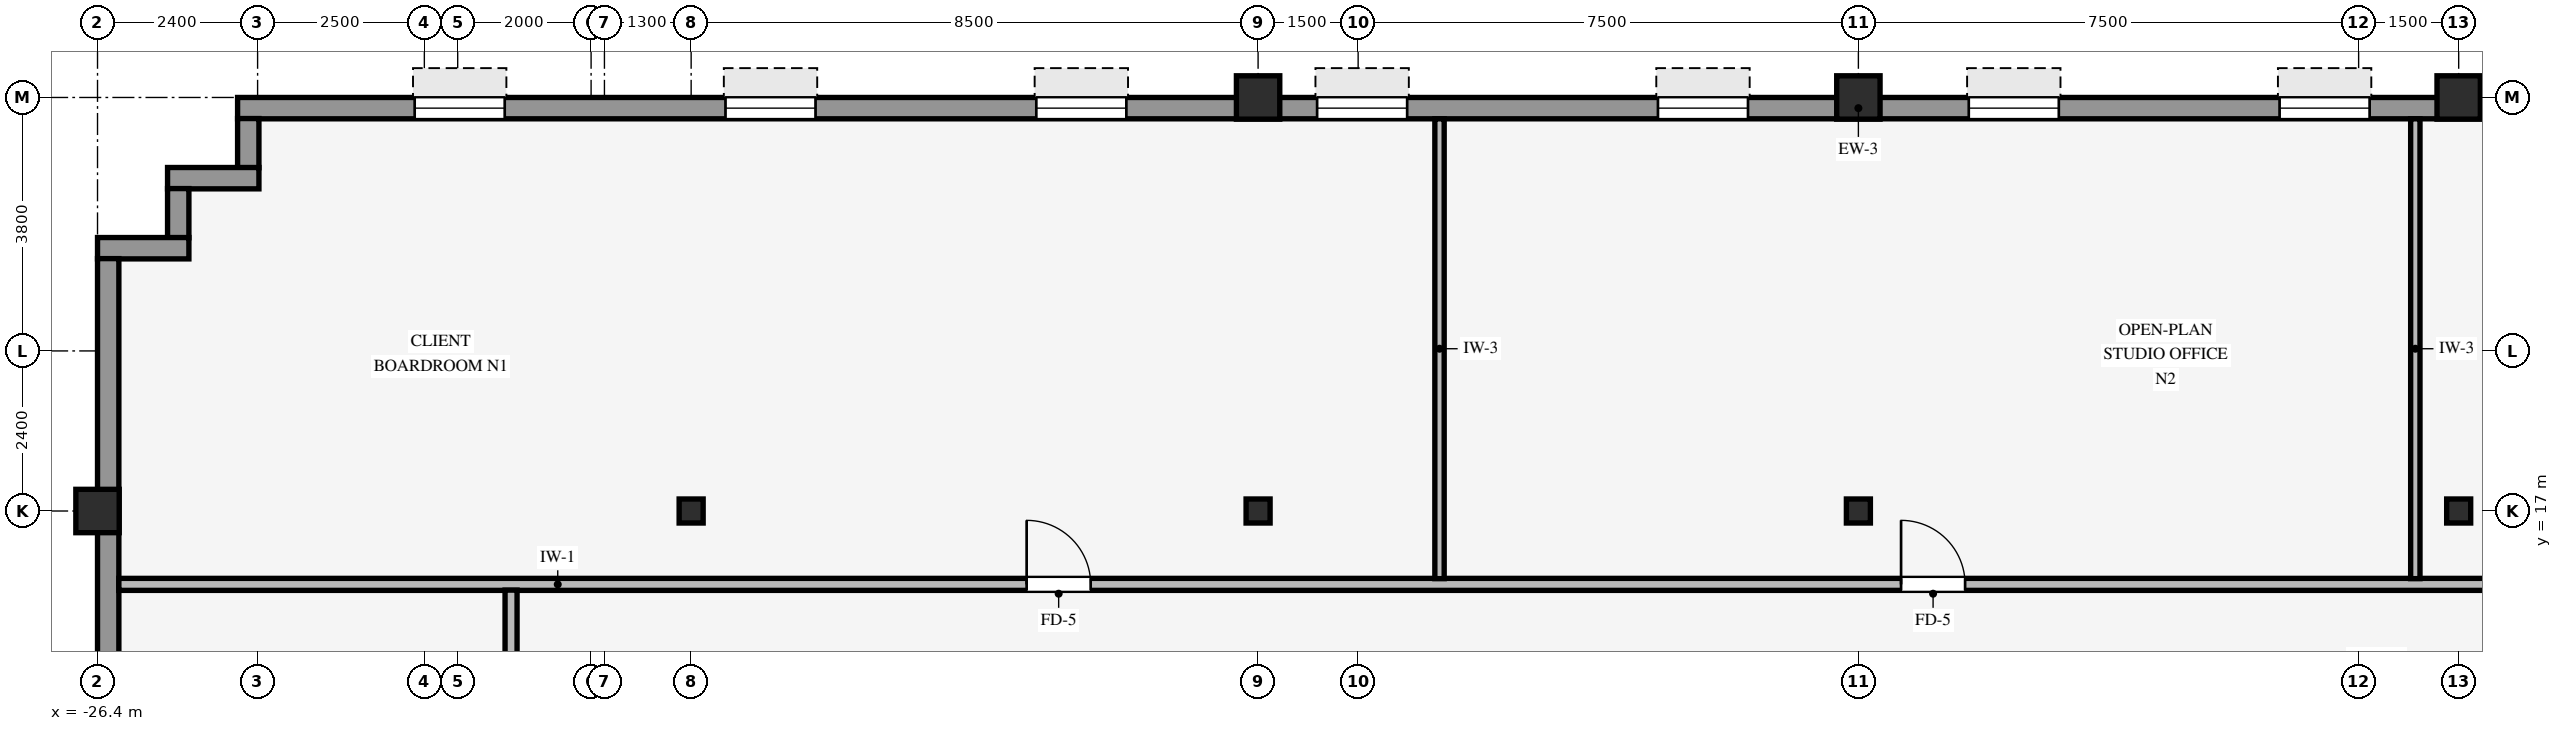
"""IFC4 building model, lengths in metres.
Left out: names, types, materials, properties, quantities, classifications, styles, units other than length and angle.
Written with IfcOpenShell. Run it as: python <this file> out.ifc"""

import sys

from ifc_helpers import new_model, si_unit, direction, frame, frame_2d, origin, origin_2d, place, context, subcontext, project, spatial, rectangle, hollow_rectangle, i_section, extrude, source, transform, mapped, element, fill, save


model = new_model("IFC4")
c1 = context("Model", 3, precision=1e-05, world=origin(), true_north=direction((0.0, 1.0)))
c2 = subcontext(c1, "Body", "Model", "MODEL_VIEW")
j1 = project(units=[si_unit("LENGTHUNIT", "METRE"), si_unit("PLANEANGLEUNIT", "RADIAN")], contexts=[c1])
p1 = place(None, origin())
s1 = spatial("IfcSite", under=j1, at=p1, CompositionType="ELEMENT")
p2 = place(p1, origin())
s2 = spatial("IfcBuilding", under=s1, at=p2, CompositionType="ELEMENT")
p3 = place(p2, frame((0.0, 0.0, 153.05)))
s3 = spatial("IfcBuildingStorey", under=s2, at=p3, CompositionType="ELEMENT", Elevation=153.05)
for number, where, z_axis, x_axis in (
    (1, (-26.4, 17.0, 0.0), (0.0, 0.0, 1.0), (1.0, 0.0, 0.0)),
    (2, (-9.0, 23.2, 0.0), (0.0, 0.0, 1.0), (1.0, 0.0, 0.0)),
    (3, (0.0, 23.2, 0.0), (0.0, 0.0, 1.0), (1.0, 0.0, 0.0)),
    (4, (9.0, 23.2, 0.0), (0.0, 0.0, 1.0), (1.0, 0.0, 0.0)),
):
    element("IfcColumn", number, at=place(p3, frame(where, z_axis=z_axis, x_axis=x_axis)), inside=s3, PredefinedType="COLUMN", context=c2, shape_type="SweptSolid", body=[
        extrude(hollow_rectangle(XDim=0.65, YDim=0.65, WallThickness=0.04, InnerFilletRadius=0.04, OuterFilletRadius=0.08, at=origin_2d()), origin(), (0.0, 0.0, 1.0), 3.37),
    ])
for number, where, z_axis, x_axis in (
    (5, (0.0, 17.0, 0.0), (0.0, 0.0, 1.0), (1.0, 0.0, 0.0)),
    (6, (-17.5, 17.0, 0.0), (0.0, 0.0, 1.0), (1.0, 0.0, 0.0)),
    (7, (-9.0, 17.0, 0.0), (0.0, 0.0, 1.0), (1.0, 0.0, 0.0)),
    (8, (9.0, 17.0, 0.0), (0.0, 0.0, 1.0), (1.0, 0.0, 0.0)),
):
    element("IfcColumn", number, at=place(p3, frame(where, z_axis=z_axis, x_axis=x_axis)), inside=s3, PredefinedType="COLUMN", context=c2, shape_type="SweptSolid", body=[
        extrude(i_section(OverallWidth=0.36, OverallDepth=0.36, WebThickness=0.021, FlangeThickness=0.021, FilletRadius=0.018, at=origin_2d()), origin(), (0.0, 0.0, 1.0), 3.37),
    ])
p4 = place(p3, frame((-24.3, 23.04, 0.0), z_axis=(0.0, 0.0, 1.0), x_axis=(1.0, 0.0, 0.0)))
e9 = element("IfcWall", 9, at=p4, inside=s3, PredefinedType="STANDARD", context=c2, shape_type="SweptSolid", body=[
    extrude(rectangle(XDim=48.6, YDim=0.32, at=frame_2d((24.3, 0.0))), origin(), (0.0, 0.0, 1.0), 2.705),
])
p5 = place(p4, frame((2.655, 0.0, 0.8)))
e10 = element("IfcOpeningElement", 10, at=p5, cuts=e9, PredefinedType="OPENING", context=c2, shape_type="SweptSolid", body=[
    extrude(rectangle(XDim=1.35, YDim=1.56, at=frame_2d((0.675, 0.78))), frame((0.0, 0.17, 0.0), z_axis=(0.0, -1.0, 0.0), x_axis=(1.0, 0.0, 0.0)), (0.0, 0.0, 1.0), 0.34),
])
p6 = place(p4, frame((7.315, 0.0, 0.8)))
e11 = element("IfcOpeningElement", 11, at=p6, cuts=e9, PredefinedType="OPENING", context=c2, shape_type="SweptSolid", body=[
    extrude(rectangle(XDim=1.35, YDim=1.56, at=frame_2d((0.675, 0.78))), frame((0.0, 0.17, 0.0), z_axis=(0.0, -1.0, 0.0), x_axis=(1.0, 0.0, 0.0)), (0.0, 0.0, 1.0), 0.34),
])
p7 = place(p4, frame((11.975, 0.0, 0.8)))
e12 = element("IfcOpeningElement", 12, at=p7, cuts=e9, PredefinedType="OPENING", context=c2, shape_type="SweptSolid", body=[
    extrude(rectangle(XDim=1.35, YDim=1.56, at=frame_2d((0.675, 0.78))), frame((0.0, 0.17, 0.0), z_axis=(0.0, -1.0, 0.0), x_axis=(1.0, 0.0, 0.0)), (0.0, 0.0, 1.0), 0.34),
])
p8 = place(p4, frame((16.185, 0.0, 0.8)))
e13 = element("IfcOpeningElement", 13, at=p8, cuts=e9, PredefinedType="OPENING", context=c2, shape_type="SweptSolid", body=[
    extrude(rectangle(XDim=1.35, YDim=1.56, at=frame_2d((0.675, 0.78))), frame((0.0, 0.17, 0.0), z_axis=(0.0, -1.0, 0.0), x_axis=(1.0, 0.0, 0.0)), (0.0, 0.0, 1.0), 0.34),
])
p9 = place(p4, frame((21.295, 0.0, 0.8)))
e14 = element("IfcOpeningElement", 14, at=p9, cuts=e9, PredefinedType="OPENING", context=c2, shape_type="SweptSolid", body=[
    extrude(rectangle(XDim=1.35, YDim=1.56, at=frame_2d((0.675, 0.78))), frame((0.0, 0.17, 0.0), z_axis=(0.0, -1.0, 0.0), x_axis=(1.0, 0.0, 0.0)), (0.0, 0.0, 1.0), 0.34),
])
p10 = place(p4, frame((25.955, 0.0, 0.8)))
e15 = element("IfcOpeningElement", 15, at=p10, cuts=e9, PredefinedType="OPENING", context=c2, shape_type="SweptSolid", body=[
    extrude(rectangle(XDim=1.35, YDim=1.56, at=frame_2d((0.675, 0.78))), frame((0.0, 0.17, 0.0), z_axis=(0.0, -1.0, 0.0), x_axis=(1.0, 0.0, 0.0)), (0.0, 0.0, 1.0), 0.34),
])
p11 = place(p4, frame((30.615, 0.0, 0.8)))
e16 = element("IfcOpeningElement", 16, at=p11, cuts=e9, PredefinedType="OPENING", context=c2, shape_type="SweptSolid", body=[
    extrude(rectangle(XDim=1.35, YDim=1.56, at=frame_2d((0.675, 0.78))), frame((0.0, 0.17, 0.0), z_axis=(0.0, -1.0, 0.0), x_axis=(1.0, 0.0, 0.0)), (0.0, 0.0, 1.0), 0.34),
])
p12 = place(p4, frame((35.275, 0.0, 0.8)))
e17 = element("IfcOpeningElement", 17, at=p12, cuts=e9, PredefinedType="OPENING", context=c2, shape_type="SweptSolid", body=[
    extrude(rectangle(XDim=1.35, YDim=1.56, at=frame_2d((0.675, 0.78))), frame((0.0, 0.17, 0.0), z_axis=(0.0, -1.0, 0.0), x_axis=(1.0, 0.0, 0.0)), (0.0, 0.0, 1.0), 0.34),
])
p13 = place(p4, frame((39.935, 0.0, 0.8)))
e18 = element("IfcOpeningElement", 18, at=p13, cuts=e9, PredefinedType="OPENING", context=c2, shape_type="SweptSolid", body=[
    extrude(rectangle(XDim=1.35, YDim=1.56, at=frame_2d((0.675, 0.78))), frame((0.0, 0.17, 0.0), z_axis=(0.0, -1.0, 0.0), x_axis=(1.0, 0.0, 0.0)), (0.0, 0.0, 1.0), 0.34),
])
p14 = place(p4, frame((44.595, 0.0, 0.8)))
e19 = element("IfcOpeningElement", 19, at=p14, cuts=e9, PredefinedType="OPENING", context=c2, shape_type="SweptSolid", body=[
    extrude(rectangle(XDim=1.35, YDim=1.56, at=frame_2d((0.675, 0.78))), frame((0.0, 0.17, 0.0), z_axis=(0.0, -1.0, 0.0), x_axis=(1.0, 0.0, 0.0)), (0.0, 0.0, 1.0), 0.34),
])
p15 = place(p3, frame((-24.14, 22.146, 0.0), z_axis=(0.0, 0.0, 1.0), x_axis=(0.0, 1.0, 0.0)))
e20 = element("IfcWall", 20, at=p15, inside=s3, PredefinedType="STANDARD", context=c2, shape_type="SweptSolid", body=[
    extrude(rectangle(XDim=0.738, YDim=0.32, at=frame_2d((0.369, 0.0))), origin(), (0.0, 0.0, 1.0), 3.36),
])
p16 = place(p3, frame((-25.35, 21.99, 0.0), z_axis=(0.0, 0.0, 1.0), x_axis=(1.0, 0.0, 0.0)))
e21 = element("IfcWall", 21, at=p16, inside=s3, PredefinedType="STANDARD", context=c2, shape_type="SweptSolid", body=[
    extrude(rectangle(XDim=1.37, YDim=0.32, at=frame_2d((0.685, 0.0))), origin(), (0.0, 0.0, 1.0), 3.36),
])
p17 = place(p3, frame((-25.19, 21.096, 0.0), z_axis=(0.0, 0.0, 1.0), x_axis=(0.0, 1.0, 0.0)))
e22 = element("IfcWall", 22, at=p17, inside=s3, PredefinedType="STANDARD", context=c2, shape_type="SweptSolid", body=[
    extrude(rectangle(XDim=0.738, YDim=0.32, at=frame_2d((0.369, 0.0))), origin(), (0.0, 0.0, 1.0), 3.36),
])
p18 = place(p3, frame((-26.4, 20.94, 0.0), z_axis=(0.0, 0.0, 1.0), x_axis=(1.0, 0.0, 0.0)))
e23 = element("IfcWall", 23, at=p18, inside=s3, PredefinedType="STANDARD", context=c2, shape_type="SweptSolid", body=[
    extrude(rectangle(XDim=1.37, YDim=0.32, at=frame_2d((0.685, 0.0))), origin(), (0.0, 0.0, 1.0), 3.36),
])
p19 = place(p3, frame((-26.24, -20.784, 0.0), z_axis=(0.0, 0.0, 1.0), x_axis=(0.0, 1.0, 0.0)))
e24 = element("IfcWall", 24, at=p19, inside=s3, PredefinedType="STANDARD", context=c2, shape_type="SweptSolid", body=[
    extrude(rectangle(XDim=41.568, YDim=0.32, at=frame_2d((20.784, 0.0))), origin(), (0.0, 0.0, 1.0), 2.705),
])
p20 = place(p19, frame((7.369, 0.0, 0.8)))
e25 = element("IfcOpeningElement", 25, at=p20, cuts=e24, PredefinedType="OPENING", context=c2, shape_type="SweptSolid", body=[
    extrude(rectangle(XDim=2.1, YDim=1.56, at=frame_2d((1.05, 0.78))), frame((0.0, 0.17, 0.0), z_axis=(0.0, -1.0, 0.0), x_axis=(1.0, 0.0, 0.0)), (0.0, 0.0, 1.0), 0.34),
])
p21 = place(p19, frame((12.315, 0.0, 0.8)))
e26 = element("IfcOpeningElement", 26, at=p21, cuts=e24, PredefinedType="OPENING", context=c2, shape_type="SweptSolid", body=[
    extrude(rectangle(XDim=2.1, YDim=1.56, at=frame_2d((1.05, 0.78))), frame((0.0, 0.17, 0.0), z_axis=(0.0, -1.0, 0.0), x_axis=(1.0, 0.0, 0.0)), (0.0, 0.0, 1.0), 0.34),
])
p22 = place(p19, frame((17.261, 0.0, 0.8)))
e27 = element("IfcOpeningElement", 27, at=p22, cuts=e24, PredefinedType="OPENING", context=c2, shape_type="SweptSolid", body=[
    extrude(rectangle(XDim=2.1, YDim=1.56, at=frame_2d((1.05, 0.78))), frame((0.0, 0.17, 0.0), z_axis=(0.0, -1.0, 0.0), x_axis=(1.0, 0.0, 0.0)), (0.0, 0.0, 1.0), 0.34),
])
p23 = place(p19, frame((22.207, 0.0, 0.8)))
e28 = element("IfcOpeningElement", 28, at=p23, cuts=e24, PredefinedType="OPENING", context=c2, shape_type="SweptSolid", body=[
    extrude(rectangle(XDim=2.1, YDim=1.56, at=frame_2d((1.05, 0.78))), frame((0.0, 0.17, 0.0), z_axis=(0.0, -1.0, 0.0), x_axis=(1.0, 0.0, 0.0)), (0.0, 0.0, 1.0), 0.34),
])
p24 = place(p19, frame((27.153, 0.0, 0.8)))
e29 = element("IfcOpeningElement", 29, at=p24, cuts=e24, PredefinedType="OPENING", context=c2, shape_type="SweptSolid", body=[
    extrude(rectangle(XDim=2.1, YDim=1.56, at=frame_2d((1.05, 0.78))), frame((0.0, 0.17, 0.0), z_axis=(0.0, -1.0, 0.0), x_axis=(1.0, 0.0, 0.0)), (0.0, 0.0, 1.0), 0.34),
])
p25 = place(p19, frame((32.099, 0.0, 0.8)))
e30 = element("IfcOpeningElement", 30, at=p25, cuts=e24, PredefinedType="OPENING", context=c2, shape_type="SweptSolid", body=[
    extrude(rectangle(XDim=2.1, YDim=1.56, at=frame_2d((1.05, 0.78))), frame((0.0, 0.17, 0.0), z_axis=(0.0, -1.0, 0.0), x_axis=(1.0, 0.0, 0.0)), (0.0, 0.0, 1.0), 0.34),
])
p26 = place(p3, frame((-26.08, 15.9, 0.0), z_axis=(0.0, 0.0, 1.0), x_axis=(1.0, 0.0, 0.0)))
e31 = element("IfcWall", 31, at=p26, inside=s3, PredefinedType="PARTITIONING", context=c2, shape_type="SweptSolid", body=[
    extrude(rectangle(XDim=52.16, YDim=0.18, at=frame_2d((26.08, 0.0))), origin(), (0.0, 0.0, 1.0), 3.36),
])
p27 = place(p26, frame((26.72, 0.0, 0.0)))
e32 = element("IfcOpeningElement", 32, at=p27, cuts=e31, PredefinedType="OPENING", context=c2, shape_type="SweptSolid", body=[
    extrude(rectangle(XDim=0.96, YDim=2.1, at=frame_2d((0.48, 1.05))), frame((0.0, 0.1, 0.0), z_axis=(0.0, -1.0, 0.0), x_axis=(1.0, 0.0, 0.0)), (0.0, 0.0, 1.0), 0.2),
])
p28 = place(p26, frame((40.5, 0.0, 0.0)))
e33 = element("IfcOpeningElement", 33, at=p28, cuts=e31, PredefinedType="OPENING", context=c2, shape_type="SweptSolid", body=[
    extrude(rectangle(XDim=0.96, YDim=2.1, at=frame_2d((0.48, 1.05))), frame((0.0, 0.1, 0.0), z_axis=(0.0, -1.0, 0.0), x_axis=(1.0, 0.0, 0.0)), (0.0, 0.0, 1.0), 0.2),
])
p29 = place(p26, frame((13.61, 0.0, 0.0)))
e34 = element("IfcOpeningElement", 34, at=p29, cuts=e31, PredefinedType="OPENING", context=c2, shape_type="SweptSolid", body=[
    extrude(rectangle(XDim=0.96, YDim=2.1, at=frame_2d((0.48, 1.05))), frame((0.0, 0.1, 0.0), z_axis=(0.0, -1.0, 0.0), x_axis=(1.0, 0.0, 0.0)), (0.0, 0.0, 1.0), 0.2),
])
p30 = place(p3, frame((-20.2, -15.814, 0.0), z_axis=(0.0, 0.0, 1.0), x_axis=(0.0, 1.0, 0.0)))
e35 = element("IfcWall", 35, at=p30, inside=s3, PredefinedType="PARTITIONING", context=c2, shape_type="SweptSolid", body=[
    extrude(rectangle(XDim=31.628, YDim=0.18, at=frame_2d((15.814, 0.0))), origin(), (0.0, 0.0, 1.0), 3.36),
])
p31 = place(p30, frame((15.334, 0.0, 0.0)))
e36 = element("IfcOpeningElement", 36, at=p31, cuts=e35, PredefinedType="OPENING", context=c2, shape_type="SweptSolid", body=[
    extrude(rectangle(XDim=0.96, YDim=2.1, at=frame_2d((0.48, 1.05))), frame((0.0, 0.1, 0.0), z_axis=(0.0, -1.0, 0.0), x_axis=(1.0, 0.0, 0.0)), (0.0, 0.0, 1.0), 0.2),
])
p32 = place(p30, frame((5.834, 0.0, 0.0)))
e37 = element("IfcOpeningElement", 37, at=p32, cuts=e35, PredefinedType="OPENING", context=c2, shape_type="SweptSolid", body=[
    extrude(rectangle(XDim=0.96, YDim=2.1, at=frame_2d((0.48, 1.05))), frame((0.0, 0.1, 0.0), z_axis=(0.0, -1.0, 0.0), x_axis=(1.0, 0.0, 0.0)), (0.0, 0.0, 1.0), 0.2),
])
p33 = place(p30, frame((24.834, 0.0, 0.0)))
e38 = element("IfcOpeningElement", 38, at=p33, cuts=e35, PredefinedType="OPENING", context=c2, shape_type="SweptSolid", body=[
    extrude(rectangle(XDim=0.96, YDim=2.1, at=frame_2d((0.48, 1.05))), frame((0.0, 0.1, 0.0), z_axis=(0.0, -1.0, 0.0), x_axis=(1.0, 0.0, 0.0)), (0.0, 0.0, 1.0), 0.2),
])
for number, where, z_axis, x_axis in (
    (39, (-6.28, 15.986, 0.0), (0.0, 0.0, 1.0), (0.0, 1.0, 0.0)),
    (40, (8.35, 15.986, 0.0), (0.0, 0.0, 1.0), (0.0, 1.0, 0.0)),
):
    element("IfcWall", number, at=place(p3, frame(where, z_axis=z_axis, x_axis=x_axis)), inside=s3, PredefinedType="PARTITIONING", context=c2, shape_type="SweptSolid", body=[
        extrude(rectangle(XDim=6.894, YDim=0.14, at=frame_2d((3.447, 0.0))), origin(), (0.0, 0.0, 1.0), 3.36),
    ])
m1 = source(origin(), c2, "Body", "SweptSolid", [
    extrude(rectangle(XDim=1.35, YDim=1.56, at=frame_2d((0.675, 0.78))), frame((0.0, 0.03, 0.0), z_axis=(0.0, -1.0, 0.0), x_axis=(1.0, 0.0, 0.0)), (0.0, 0.0, 1.0), 0.06),
])
p34 = place(p5, origin())
e41 = element("IfcWindow", 41, at=p34, inside=s3, PartitioningType="SINGLE_PANEL", PredefinedType="WINDOW", context=c2, shape_type="MappedRepresentation", body=[
    mapped(m1, transform((0.0, 0.0, 0.0), scale=1.0)),
])
fill(e10, e41)
p35 = place(p6, origin())
e42 = element("IfcWindow", 42, at=p35, inside=s3, PartitioningType="SINGLE_PANEL", PredefinedType="WINDOW", context=c2, shape_type="MappedRepresentation", body=[
    mapped(m1, transform((0.0, 0.0, 0.0), scale=1.0)),
])
fill(e11, e42)
p36 = place(p7, origin())
e43 = element("IfcWindow", 43, at=p36, inside=s3, PartitioningType="SINGLE_PANEL", PredefinedType="WINDOW", context=c2, shape_type="MappedRepresentation", body=[
    mapped(m1, transform((0.0, 0.0, 0.0), scale=1.0)),
])
fill(e12, e43)
p37 = place(p8, origin())
e44 = element("IfcWindow", 44, at=p37, inside=s3, PartitioningType="SINGLE_PANEL", PredefinedType="WINDOW", context=c2, shape_type="MappedRepresentation", body=[
    mapped(m1, transform((0.0, 0.0, 0.0), scale=1.0)),
])
fill(e13, e44)
p38 = place(p9, origin())
e45 = element("IfcWindow", 45, at=p38, inside=s3, PartitioningType="SINGLE_PANEL", PredefinedType="WINDOW", context=c2, shape_type="MappedRepresentation", body=[
    mapped(m1, transform((0.0, 0.0, 0.0), scale=1.0)),
])
fill(e14, e45)
p39 = place(p10, origin())
e46 = element("IfcWindow", 46, at=p39, inside=s3, PartitioningType="SINGLE_PANEL", PredefinedType="WINDOW", context=c2, shape_type="MappedRepresentation", body=[
    mapped(m1, transform((0.0, 0.0, 0.0), scale=1.0)),
])
fill(e15, e46)
p40 = place(p11, origin())
e47 = element("IfcWindow", 47, at=p40, inside=s3, PartitioningType="SINGLE_PANEL", PredefinedType="WINDOW", context=c2, shape_type="MappedRepresentation", body=[
    mapped(m1, transform((0.0, 0.0, 0.0), scale=1.0)),
])
fill(e16, e47)
m2 = source(origin(), c2, "Body", "SweptSolid", [
    extrude(rectangle(XDim=0.96, YDim=2.1, at=frame_2d((0.48, 1.05))), frame((0.0, 0.025, 0.0), z_axis=(0.0, -1.0, 0.0), x_axis=(1.0, 0.0, 0.0)), (0.0, 0.0, 1.0), 0.05),
])
p41 = place(p27, origin())
e48 = element("IfcDoor", 48, at=p41, inside=s3, OperationType="SINGLE_SWING_LEFT", PredefinedType="DOOR", context=c2, shape_type="MappedRepresentation", body=[
    mapped(m2, transform((0.0, 0.0, 0.0), scale=1.0)),
])
fill(e32, e48)
p42 = place(p29, origin())
e49 = element("IfcDoor", 49, at=p42, inside=s3, OperationType="SINGLE_SWING_LEFT", PredefinedType="DOOR", context=c2, shape_type="MappedRepresentation", body=[
    mapped(m2, transform((0.0, 0.0, 0.0), scale=1.0)),
])
fill(e34, e49)
save(model, sys.argv[1])
